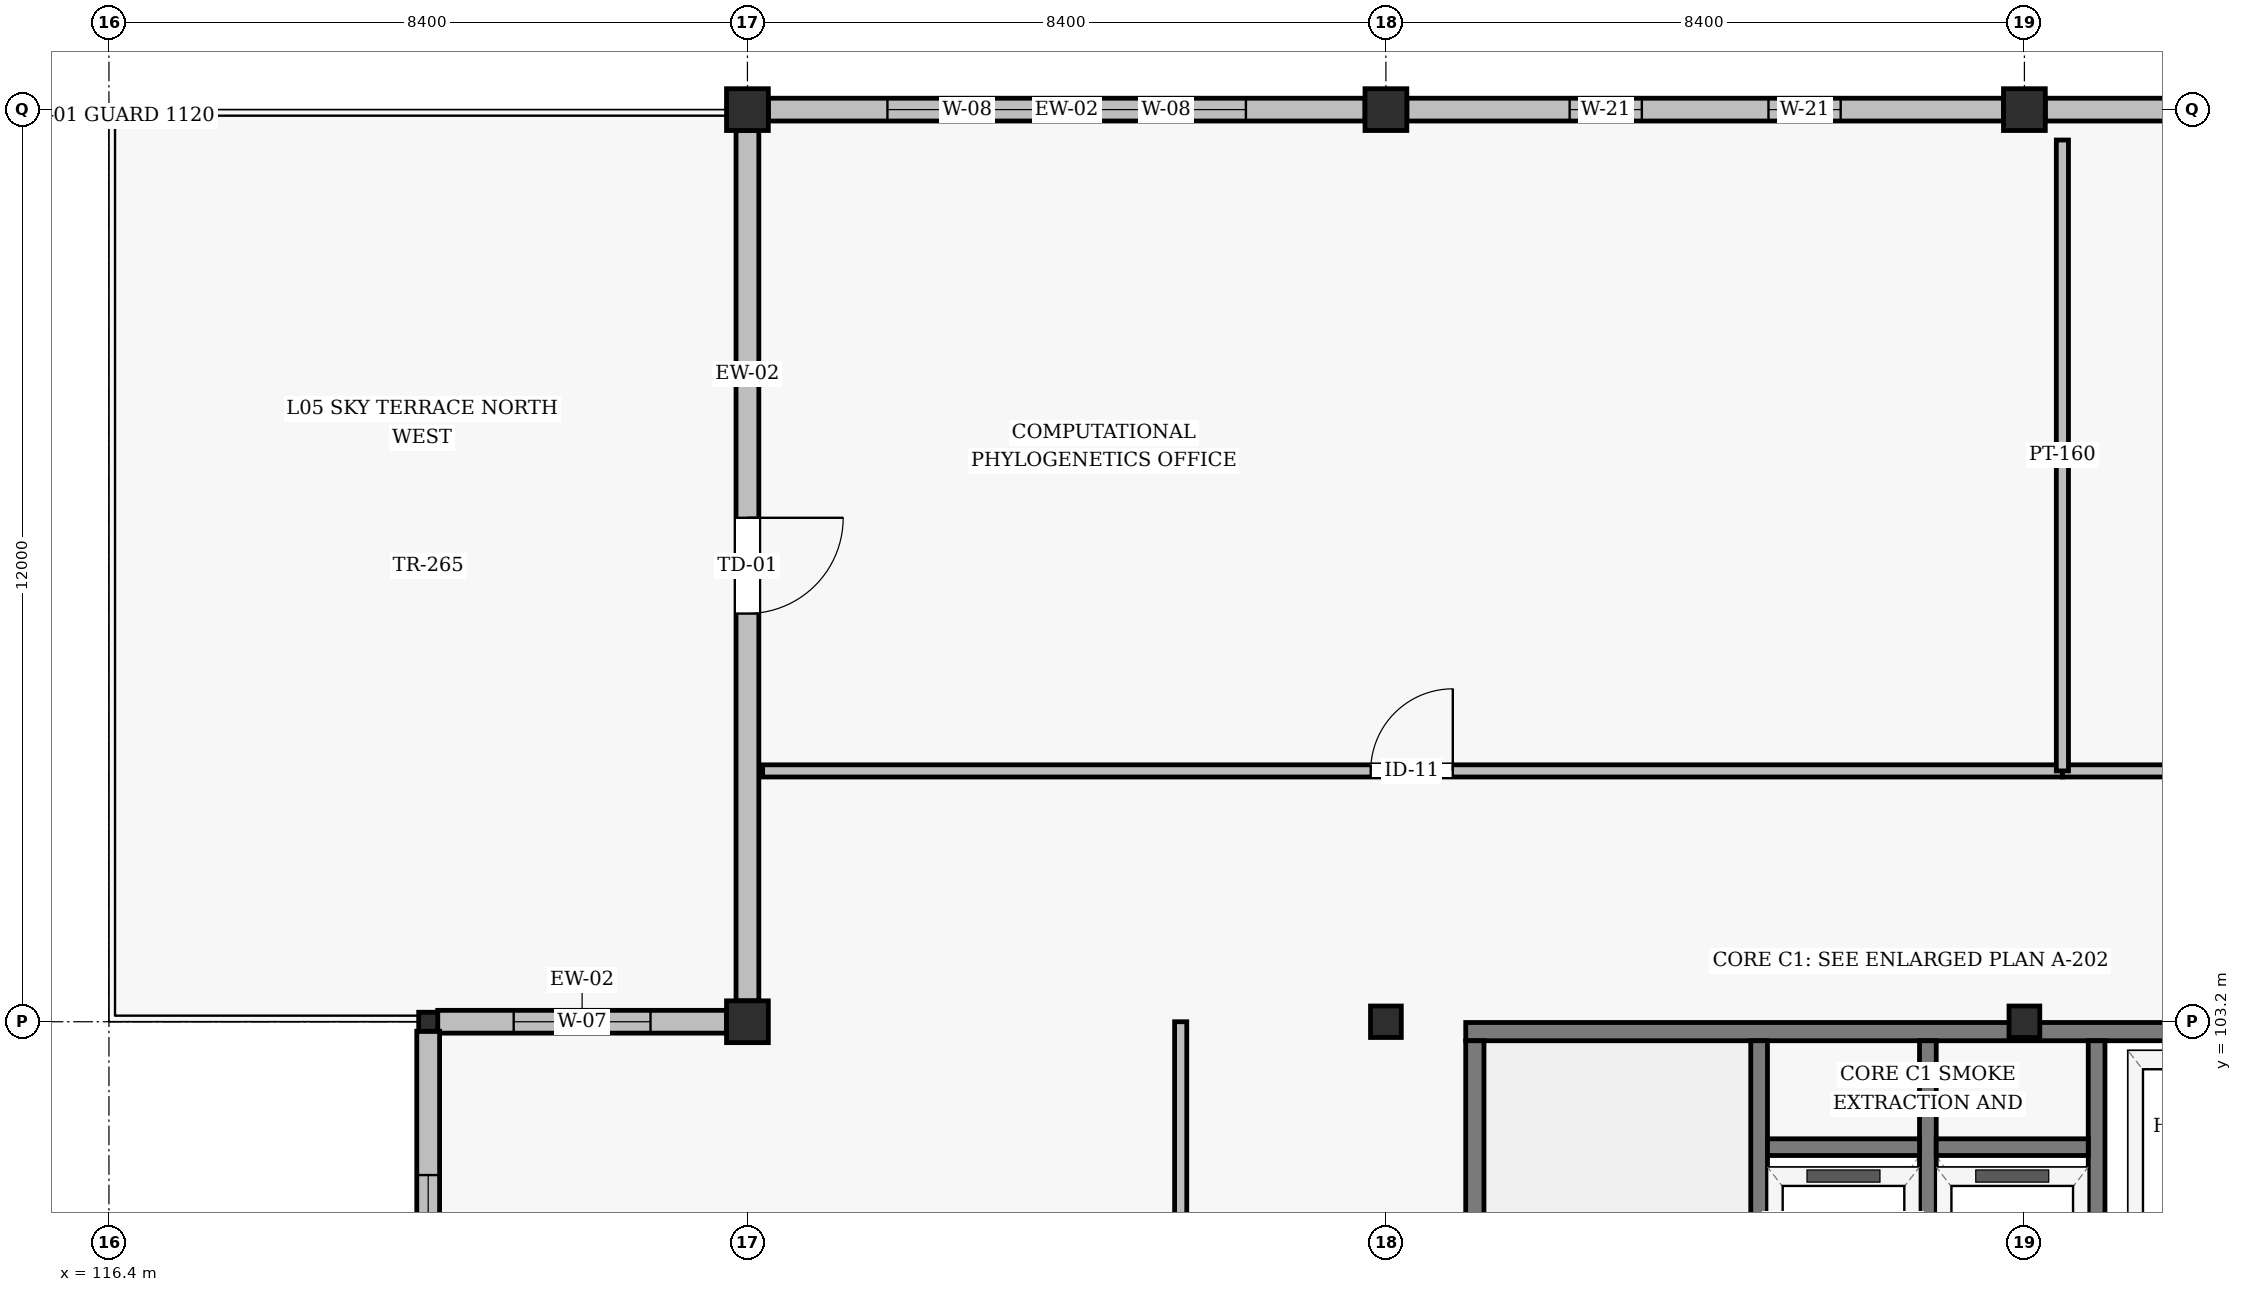
"""IFC4 building model, lengths in metres.
Left out: names, types, materials, properties, quantities, classifications, styles, units other than length and angle.
Written with IfcOpenShell. Run it as: python <this file> out.ifc"""

import sys

from ifc_helpers import new_model, si_unit, direction, frame, frame_2d, origin, origin_2d, place, context, subcontext, project, spatial, rectangle, hollow_rectangle, i_section, extrude, element, fill, save


model = new_model("IFC4")
c1 = context("Model", 3, precision=1e-05, world=origin(), true_north=direction((0.0, 1.0)))
c2 = subcontext(c1, "Body", "Model", "MODEL_VIEW")
j1 = project(units=[si_unit("LENGTHUNIT", "METRE"), si_unit("PLANEANGLEUNIT", "RADIAN")], contexts=[c1])
p1 = place(None, origin())
s1 = spatial("IfcSite", under=j1, at=p1, CompositionType="ELEMENT")
p2 = place(p1, origin())
s2 = spatial("IfcBuilding", under=s1, at=p2, CompositionType="ELEMENT")
p3 = place(p2, frame((0.0, 0.0, 21.0)))
s3 = spatial("IfcBuildingStorey", under=s2, at=p3, CompositionType="ELEMENT", Elevation=21.0)
p4 = place(p3, frame((120.6, 103.2, -0.3), z_axis=(0.0, 0.0, 1.0), x_axis=(1.0, 0.0, 0.0)))
e1 = element("IfcColumn", 1, at=p4, inside=s3, PredefinedType="COLUMN", context=c2, shape_type="SweptSolid", body=[
    extrude(i_section(OverallWidth=0.25, OverallDepth=0.25, WebThickness=0.009, FlangeThickness=0.014, FilletRadius=0.016, at=origin_2d()), origin(), (0.0, 0.0, 1.0), 3.9),
])
for number, where, z_axis, x_axis in (
    (2, (124.8, 103.2, 0.0), (0.0, 0.0, 1.0), (1.0, 0.0, 0.0)),
    (3, (124.8, 115.2, 0.0), (0.0, 0.0, 1.0), (1.0, 0.0, 0.0)),
):
    element("IfcColumn", number, at=place(p3, frame(where, z_axis=z_axis, x_axis=x_axis)), inside=s3, PredefinedType="COLUMN", context=c2, shape_type="SweptSolid", body=[
        extrude(hollow_rectangle(XDim=0.55, YDim=0.55, WallThickness=0.022, InnerFilletRadius=0.022, OuterFilletRadius=0.044, at=origin_2d()), origin(), (0.0, 0.0, 1.0), 3.6),
    ])
p5 = place(p3, frame((133.2, 103.2, 0.0), z_axis=(0.0, 0.0, 1.0), x_axis=(1.0, 0.0, 0.0)))
e4 = element("IfcColumn", 4, at=p5, inside=s3, PredefinedType="COLUMN", context=c2, shape_type="SweptSolid", body=[
    extrude(i_section(OverallWidth=0.405, OverallDepth=0.414, WebThickness=0.018, FlangeThickness=0.028, FilletRadius=0.022, at=origin_2d()), origin(), (0.0, 0.0, 1.0), 3.6),
])
p6 = place(p3, frame((133.2, 115.2, 0.0), z_axis=(0.0, 0.0, 1.0), x_axis=(1.0, 0.0, 0.0)))
e5 = element("IfcColumn", 5, at=p6, inside=s3, PredefinedType="COLUMN", context=c2, shape_type="SweptSolid", body=[
    extrude(hollow_rectangle(XDim=0.55, YDim=0.55, WallThickness=0.022, InnerFilletRadius=0.022, OuterFilletRadius=0.044, at=origin_2d()), origin(), (0.0, 0.0, 1.0), 3.6),
])
p7 = place(p3, frame((141.6, 103.2, 0.0), z_axis=(0.0, 0.0, 1.0), x_axis=(1.0, 0.0, 0.0)))
e6 = element("IfcColumn", 6, at=p7, inside=s3, PredefinedType="COLUMN", context=c2, shape_type="SweptSolid", body=[
    extrude(i_section(OverallWidth=0.405, OverallDepth=0.414, WebThickness=0.018, FlangeThickness=0.028, FilletRadius=0.022, at=origin_2d()), origin(), (0.0, 0.0, 1.0), 3.6),
])
p8 = place(p3, frame((141.6, 115.2, 0.0), z_axis=(0.0, 0.0, 1.0), x_axis=(1.0, 0.0, 0.0)))
e7 = element("IfcColumn", 7, at=p8, inside=s3, PredefinedType="COLUMN", context=c2, shape_type="SweptSolid", body=[
    extrude(hollow_rectangle(XDim=0.55, YDim=0.55, WallThickness=0.022, InnerFilletRadius=0.022, OuterFilletRadius=0.044, at=origin_2d()), origin(), (0.0, 0.0, 1.0), 3.6),
])
p9 = place(p3, frame((149.725, 115.2, 0.0), z_axis=(0.0, 0.0, 1.0), x_axis=(-1.0, 0.0, 0.0)))
e8 = element("IfcWall", 8, at=p9, inside=s3, PredefinedType="SOLIDWALL", context=c2, shape_type="SweptSolid", body=[
    extrude(rectangle(XDim=7.85, YDim=0.3, at=frame_2d((3.925, 0.0))), origin(), (0.0, 0.0, 1.0), 2.85),
])
p10 = place(p9, frame((1.917, 0.0, 0.85)))
e9 = element("IfcOpeningElement", 9, at=p10, cuts=e8, PredefinedType="OPENING", context=c2, shape_type="SweptSolid", body=[
    extrude(rectangle(XDim=1.4, YDim=1.7, at=frame_2d((0.7, 0.85))), frame((0.0, 0.16, 0.0), z_axis=(0.0, -1.0, 0.0), x_axis=(1.0, 0.0, 0.0)), (0.0, 0.0, 1.0), 0.32),
])
p11 = place(p9, frame((4.533, 0.0, 0.85)))
e10 = element("IfcOpeningElement", 10, at=p11, cuts=e8, PredefinedType="OPENING", context=c2, shape_type="SweptSolid", body=[
    extrude(rectangle(XDim=1.4, YDim=1.7, at=frame_2d((0.7, 0.85))), frame((0.0, 0.16, 0.0), z_axis=(0.0, -1.0, 0.0), x_axis=(1.0, 0.0, 0.0)), (0.0, 0.0, 1.0), 0.32),
])
p12 = place(p3, frame((141.325, 115.2, 0.0), z_axis=(0.0, 0.0, 1.0), x_axis=(-1.0, 0.0, 0.0)))
e11 = element("IfcWall", 11, at=p12, inside=s3, PredefinedType="SOLIDWALL", context=c2, shape_type="SweptSolid", body=[
    extrude(rectangle(XDim=7.85, YDim=0.3, at=frame_2d((3.925, 0.0))), origin(), (0.0, 0.0, 1.0), 2.85),
])
p13 = place(p12, frame((2.142, 0.0, 0.95)))
e12 = element("IfcOpeningElement", 12, at=p13, cuts=e11, PredefinedType="OPENING", context=c2, shape_type="SweptSolid", body=[
    extrude(rectangle(XDim=0.95, YDim=1.6, at=frame_2d((0.475, 0.8))), frame((0.0, 0.16, 0.0), z_axis=(0.0, -1.0, 0.0), x_axis=(1.0, 0.0, 0.0)), (0.0, 0.0, 1.0), 0.32),
])
p14 = place(p12, frame((4.758, 0.0, 0.95)))
e13 = element("IfcOpeningElement", 13, at=p14, cuts=e11, PredefinedType="OPENING", context=c2, shape_type="SweptSolid", body=[
    extrude(rectangle(XDim=0.95, YDim=1.6, at=frame_2d((0.475, 0.8))), frame((0.0, 0.16, 0.0), z_axis=(0.0, -1.0, 0.0), x_axis=(1.0, 0.0, 0.0)), (0.0, 0.0, 1.0), 0.32),
])
p15 = place(p3, frame((132.925, 115.2, 0.0), z_axis=(0.0, 0.0, 1.0), x_axis=(-1.0, 0.0, 0.0)))
e14 = element("IfcWall", 14, at=p15, inside=s3, PredefinedType="SOLIDWALL", context=c2, shape_type="SweptSolid", body=[
    extrude(rectangle(XDim=7.85, YDim=0.3, at=frame_2d((3.925, 0.0))), origin(), (0.0, 0.0, 1.0), 2.85),
])
p16 = place(p15, frame((1.567, 0.0, 0.85)))
e15 = element("IfcOpeningElement", 15, at=p16, cuts=e14, PredefinedType="OPENING", context=c2, shape_type="SweptSolid", body=[
    extrude(rectangle(XDim=2.1, YDim=1.7, at=frame_2d((1.05, 0.85))), frame((0.0, 0.16, 0.0), z_axis=(0.0, -1.0, 0.0), x_axis=(1.0, 0.0, 0.0)), (0.0, 0.0, 1.0), 0.32),
])
p17 = place(p15, frame((4.183, 0.0, 0.85)))
e16 = element("IfcOpeningElement", 16, at=p17, cuts=e14, PredefinedType="OPENING", context=c2, shape_type="SweptSolid", body=[
    extrude(rectangle(XDim=2.1, YDim=1.7, at=frame_2d((1.05, 0.85))), frame((0.0, 0.16, 0.0), z_axis=(0.0, -1.0, 0.0), x_axis=(1.0, 0.0, 0.0)), (0.0, 0.0, 1.0), 0.32),
])
p18 = place(p3, frame((124.8, 114.925, 0.0), z_axis=(0.0, 0.0, 1.0), x_axis=(0.0, -1.0, 0.0)))
e17 = element("IfcWall", 17, at=p18, inside=s3, PredefinedType="SOLIDWALL", context=c2, shape_type="SweptSolid", body=[
    extrude(rectangle(XDim=11.45, YDim=0.3, at=frame_2d((5.725, 0.0))), origin(), (0.0, 0.0, 1.0), 2.558),
])
p19 = place(p18, frame((5.095, 0.0, 0.0)))
e18 = element("IfcOpeningElement", 18, at=p19, cuts=e17, PredefinedType="OPENING", context=c2, shape_type="SweptSolid", body=[
    extrude(rectangle(XDim=1.26, YDim=2.24, at=frame_2d((0.63, 1.12))), frame((0.0, 0.16, 0.0), z_axis=(0.0, -1.0, 0.0), x_axis=(1.0, 0.0, 0.0)), (0.0, 0.0, 1.0), 0.32),
])
p20 = place(p3, frame((124.525, 103.2, 0.0), z_axis=(0.0, 0.0, 1.0), x_axis=(-1.0, 0.0, 0.0)))
e19 = element("IfcWall", 19, at=p20, inside=s3, PredefinedType="SOLIDWALL", context=c2, shape_type="SweptSolid", body=[
    extrude(rectangle(XDim=3.8, YDim=0.3, at=frame_2d((1.9, 0.0))), origin(), (0.0, 0.0, 1.0), 2.856),
])
p21 = place(p20, frame((1.0, 0.0, 0.85)))
e20 = element("IfcOpeningElement", 20, at=p21, cuts=e19, PredefinedType="OPENING", context=c2, shape_type="SweptSolid", body=[
    extrude(rectangle(XDim=1.8, YDim=1.71, at=frame_2d((0.9, 0.855))), frame((0.0, 0.16, 0.0), z_axis=(0.0, -1.0, 0.0), x_axis=(1.0, 0.0, 0.0)), (0.0, 0.0, 1.0), 0.32),
])
p22 = place(p3, frame((120.6, 103.075, 0.0), z_axis=(0.0, 0.0, 1.0), x_axis=(0.0, -1.0, 0.0)))
e21 = element("IfcWall", 21, at=p22, inside=s3, PredefinedType="SOLIDWALL", context=c2, shape_type="SweptSolid", body=[
    extrude(rectangle(XDim=8.15, YDim=0.3, at=frame_2d((4.075, 0.0))), origin(), (0.0, 0.0, 1.0), 2.85),
])
p23 = place(p22, frame((1.892, 0.0, 0.85)))
e22 = element("IfcOpeningElement", 22, at=p23, cuts=e21, PredefinedType="OPENING", context=c2, shape_type="SweptSolid", body=[
    extrude(rectangle(XDim=1.65, YDim=1.7, at=frame_2d((0.825, 0.85))), frame((0.0, 0.16, 0.0), z_axis=(0.0, -1.0, 0.0), x_axis=(1.0, 0.0, 0.0)), (0.0, 0.0, 1.0), 0.32),
])
p24 = place(p22, frame((4.608, 0.0, 0.85)))
e23 = element("IfcOpeningElement", 23, at=p24, cuts=e21, PredefinedType="OPENING", context=c2, shape_type="SweptSolid", body=[
    extrude(rectangle(XDim=1.65, YDim=1.7, at=frame_2d((0.825, 0.85))), frame((0.0, 0.16, 0.0), z_axis=(0.0, -1.0, 0.0), x_axis=(1.0, 0.0, 0.0)), (0.0, 0.0, 1.0), 0.32),
])
p25 = place(p3, frame((134.25, 103.07, 0.0), z_axis=(0.0, 0.0, 1.0), x_axis=(1.0, 0.0, 0.0)))
e24 = element("IfcWall", 24, at=p25, inside=s3, PredefinedType="SHEAR", context=c2, shape_type="SweptSolid", body=[
    extrude(rectangle(XDim=11.65, YDim=0.24, at=frame_2d((5.825, 0.0))), origin(), (0.0, 0.0, 1.0), 3.35),
])
p26 = place(p3, frame((134.37, 95.05, 0.0), z_axis=(0.0, 0.0, 1.0), x_axis=(0.0, 1.0, 0.0)))
e25 = element("IfcWall", 25, at=p26, inside=s3, PredefinedType="SHEAR", context=c2, shape_type="SweptSolid", body=[
    extrude(rectangle(XDim=7.9, YDim=0.24, at=frame_2d((3.95, 0.0))), origin(), (0.0, 0.0, 1.0), 3.35),
])
p27 = place(p3, frame((138.11, 95.05, 0.0), z_axis=(0.0, 0.0, 1.0), x_axis=(0.0, 1.0, 0.0)))
e26 = element("IfcWall", 26, at=p27, inside=s3, PredefinedType="SHEAR", context=c2, shape_type="SweptSolid", body=[
    extrude(rectangle(XDim=7.9, YDim=0.22, at=frame_2d((3.95, 0.0))), origin(), (0.0, 0.0, 1.0), 3.35),
])
p28 = place(p3, frame((140.33, 98.54, 0.0), z_axis=(0.0, 0.0, 1.0), x_axis=(0.0, 1.0, 0.0)))
e27 = element("IfcWall", 27, at=p28, inside=s3, PredefinedType="SHEAR", context=c2, shape_type="SweptSolid", body=[
    extrude(rectangle(XDim=4.41, YDim=0.22, at=frame_2d((2.205, 0.0))), origin(), (0.0, 0.0, 1.0), 3.35),
])
p29 = place(p3, frame((142.55, 95.05, 0.0), z_axis=(0.0, 0.0, 1.0), x_axis=(0.0, 1.0, 0.0)))
e28 = element("IfcWall", 28, at=p29, inside=s3, PredefinedType="SHEAR", context=c2, shape_type="SweptSolid", body=[
    extrude(rectangle(XDim=7.9, YDim=0.22, at=frame_2d((3.95, 0.0))), origin(), (0.0, 0.0, 1.0), 3.35),
])
for number, where, z_axis, x_axis in (
    (29, (138.22, 101.55, 0.0), (0.0, 0.0, 1.0), (1.0, 0.0, 0.0)),
    (30, (140.44, 101.55, 0.0), (0.0, 0.0, 1.0), (1.0, 0.0, 0.0)),
):
    element("IfcWall", number, at=place(p3, frame(where, z_axis=z_axis, x_axis=x_axis)), inside=s3, PredefinedType="SHEAR", context=c2, shape_type="SweptSolid", body=[
        extrude(rectangle(XDim=2.0, YDim=0.22, at=frame_2d((1.0, 0.0))), origin(), (0.0, 0.0, 1.0), 3.35),
    ])
p30 = place(p3, frame((130.5, 92.3, 0.0), z_axis=(0.0, 0.0, 1.0), x_axis=(0.0, 1.0, 0.0)))
e31 = element("IfcWall", 31, at=p30, inside=s3, PredefinedType="PARTITIONING", context=c2, shape_type="SweptSolid", body=[
    extrude(rectangle(XDim=10.9, YDim=0.16, at=frame_2d((5.45, 0.0))), origin(), (0.0, 0.0, 1.0), 2.854),
])
p31 = place(p30, frame((4.9, 0.0, 0.0)))
e32 = element("IfcOpeningElement", 32, at=p31, cuts=e31, PredefinedType="OPENING", context=c2, shape_type="SweptSolid", body=[
    extrude(rectangle(XDim=1.14, YDim=2.12, at=frame_2d((0.57, 1.06))), frame((0.0, 0.09, 0.0), z_axis=(0.0, -1.0, 0.0), x_axis=(1.0, 0.0, 0.0)), (0.0, 0.0, 1.0), 0.18),
])
p32 = place(p3, frame((125.0, 106.5, 0.0), z_axis=(0.0, 0.0, 1.0), x_axis=(1.0, 0.0, 0.0)))
e33 = element("IfcWall", 33, at=p32, inside=s3, PredefinedType="PARTITIONING", context=c2, shape_type="SweptSolid", body=[
    extrude(rectangle(XDim=17.1, YDim=0.16, at=frame_2d((8.55, 0.0))), origin(), (0.0, 0.0, 1.0), 2.65),
])
p33 = place(p32, frame((8.0, 0.0, 0.0)))
e34 = element("IfcOpeningElement", 34, at=p33, cuts=e33, PredefinedType="OPENING", context=c2, shape_type="SweptSolid", body=[
    extrude(rectangle(XDim=1.08, YDim=2.08, at=frame_2d((0.54, 1.04))), frame((0.0, 0.09, 0.0), z_axis=(0.0, -1.0, 0.0), x_axis=(1.0, 0.0, 0.0)), (0.0, 0.0, 1.0), 0.18),
])
p34 = place(p3, frame((142.1, 106.5, 0.0), z_axis=(0.0, 0.0, 1.0), x_axis=(1.0, 0.0, 0.0)))
e35 = element("IfcWall", 35, at=p34, inside=s3, PredefinedType="PARTITIONING", context=c2, shape_type="SweptSolid", body=[
    extrude(rectangle(XDim=11.8, YDim=0.16, at=frame_2d((5.9, 0.0))), origin(), (0.0, 0.0, 1.0), 2.65),
])
p35 = place(p34, frame((5.3, 0.0, 0.0)))
e36 = element("IfcOpeningElement", 36, at=p35, cuts=e35, PredefinedType="OPENING", context=c2, shape_type="SweptSolid", body=[
    extrude(rectangle(XDim=1.25, YDim=2.12, at=frame_2d((0.625, 1.06))), frame((0.0, 0.09, 0.0), z_axis=(0.0, -1.0, 0.0), x_axis=(1.0, 0.0, 0.0)), (0.0, 0.0, 1.0), 0.18),
])
p36 = place(p3, frame((142.1, 106.5, 0.0), z_axis=(0.0, 0.0, 1.0), x_axis=(0.0, 1.0, 0.0)))
e37 = element("IfcWall", 37, at=p36, inside=s3, PredefinedType="PARTITIONING", context=c2, shape_type="SweptSolid", body=[
    extrude(rectangle(XDim=8.3, YDim=0.16, at=frame_2d((4.15, 0.0))), origin(), (0.0, 0.0, 1.0), 3.004),
])
p37 = place(p13, origin())
e38 = element("IfcWindow", 38, at=p37, inside=s3, PartitioningType="SINGLE_PANEL", PredefinedType="WINDOW", context=c2, shape_type="SweptSolid", body=[
    extrude(rectangle(XDim=0.95, YDim=1.6, at=frame_2d((0.475, 0.8))), frame((0.0, 0.03, 0.0), z_axis=(0.0, -1.0, 0.0), x_axis=(1.0, 0.0, 0.0)), (0.0, 0.0, 1.0), 0.06),
])
fill(e12, e38)
p38 = place(p14, origin())
e39 = element("IfcWindow", 39, at=p38, inside=s3, PartitioningType="SINGLE_PANEL", PredefinedType="WINDOW", context=c2, shape_type="SweptSolid", body=[
    extrude(rectangle(XDim=0.95, YDim=1.6, at=frame_2d((0.475, 0.8))), frame((0.0, 0.03, 0.0), z_axis=(0.0, -1.0, 0.0), x_axis=(1.0, 0.0, 0.0)), (0.0, 0.0, 1.0), 0.06),
])
fill(e13, e39)
p39 = place(p16, origin())
e40 = element("IfcWindow", 40, at=p39, inside=s3, PartitioningType="SINGLE_PANEL", PredefinedType="WINDOW", context=c2, shape_type="SweptSolid", body=[
    extrude(rectangle(XDim=2.1, YDim=1.7, at=frame_2d((1.05, 0.85))), frame((0.0, 0.03, 0.0), z_axis=(0.0, -1.0, 0.0), x_axis=(1.0, 0.0, 0.0)), (0.0, 0.0, 1.0), 0.06),
])
fill(e15, e40)
p40 = place(p17, origin())
e41 = element("IfcWindow", 41, at=p40, inside=s3, PartitioningType="SINGLE_PANEL", PredefinedType="WINDOW", context=c2, shape_type="SweptSolid", body=[
    extrude(rectangle(XDim=2.1, YDim=1.7, at=frame_2d((1.05, 0.85))), frame((0.0, 0.03, 0.0), z_axis=(0.0, -1.0, 0.0), x_axis=(1.0, 0.0, 0.0)), (0.0, 0.0, 1.0), 0.06),
])
fill(e16, e41)
p41 = place(p19, frame((1.26, 0.0, 0.0), z_axis=(0.0, 0.0, 1.0), x_axis=(-1.0, 0.0, 0.0)))
e42 = element("IfcDoor", 42, at=p41, inside=s3, OperationType="SINGLE_SWING_LEFT", PredefinedType="DOOR", context=c2, shape_type="SweptSolid", body=[
    extrude(rectangle(XDim=1.26, YDim=2.24, at=frame_2d((0.63, 1.12))), frame((0.0, 0.025, 0.0), z_axis=(0.0, -1.0, 0.0), x_axis=(1.0, 0.0, 0.0)), (0.0, 0.0, 1.0), 0.05),
])
fill(e18, e42)
p42 = place(p21, origin())
e43 = element("IfcWindow", 43, at=p42, inside=s3, PartitioningType="SINGLE_PANEL", PredefinedType="WINDOW", context=c2, shape_type="SweptSolid", body=[
    extrude(rectangle(XDim=1.8, YDim=1.71, at=frame_2d((0.9, 0.855))), frame((0.0, 0.03, 0.0), z_axis=(0.0, -1.0, 0.0), x_axis=(1.0, 0.0, 0.0)), (0.0, 0.0, 1.0), 0.06),
])
fill(e20, e43)
p43 = place(p23, origin())
e44 = element("IfcWindow", 44, at=p43, inside=s3, PartitioningType="SINGLE_PANEL", PredefinedType="WINDOW", context=c2, shape_type="SweptSolid", body=[
    extrude(rectangle(XDim=1.65, YDim=1.7, at=frame_2d((0.825, 0.85))), frame((0.0, 0.03, 0.0), z_axis=(0.0, -1.0, 0.0), x_axis=(1.0, 0.0, 0.0)), (0.0, 0.0, 1.0), 0.06),
])
fill(e22, e44)
p44 = place(p33, origin())
e45 = element("IfcDoor", 45, at=p44, inside=s3, OperationType="SINGLE_SWING_RIGHT", PredefinedType="DOOR", context=c2, shape_type="SweptSolid", body=[
    extrude(rectangle(XDim=1.08, YDim=2.08, at=frame_2d((0.54, 1.04))), frame((0.0, 0.025, 0.0), z_axis=(0.0, -1.0, 0.0), x_axis=(1.0, 0.0, 0.0)), (0.0, 0.0, 1.0), 0.05),
])
fill(e34, e45)
save(model, sys.argv[1])
